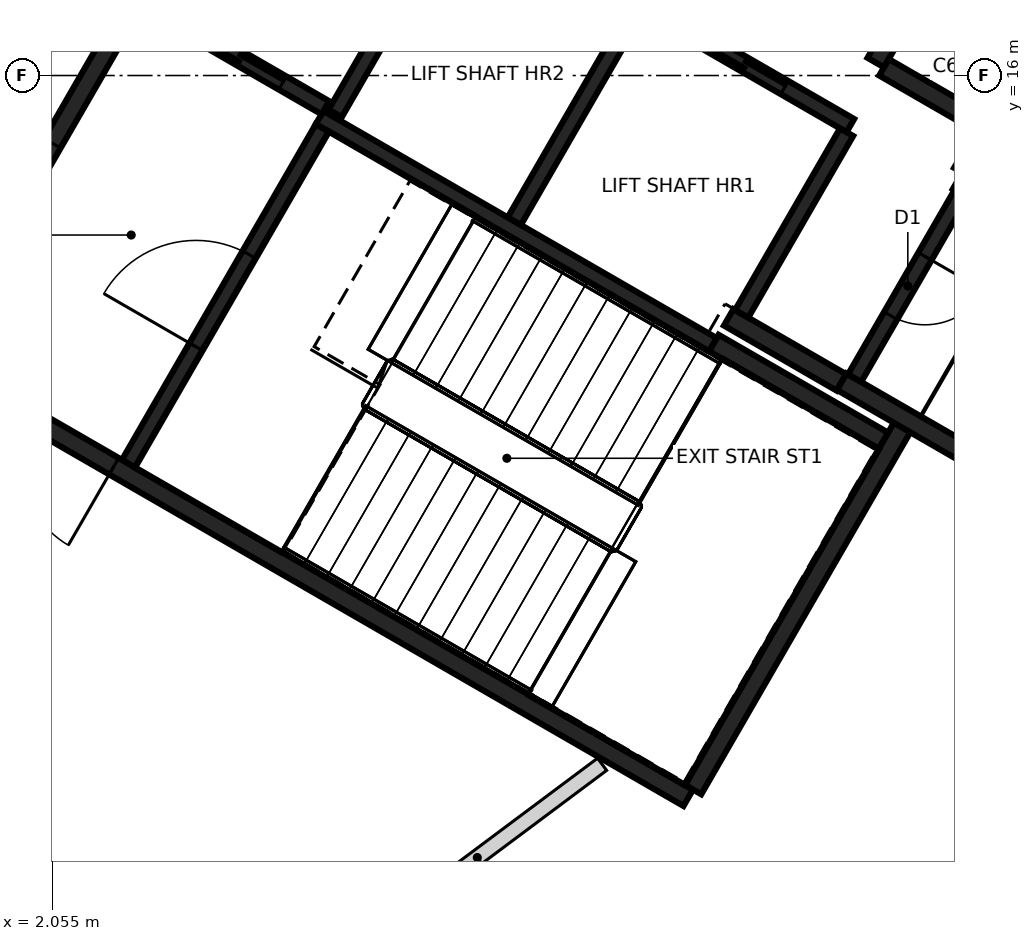
"""IFC4 building model, lengths in metres.
Left out: names, types, materials, properties, quantities, classifications, styles, units other than length and angle.
Written with IfcOpenShell. Run it as: python <this file> out.ifc"""

import sys

from ifc_helpers import new_model, si_unit, direction, frame, frame_2d, origin, place, context, subcontext, project, spatial, rectangle, extrude, element, fill, save


model = new_model("IFC4")
c1 = context("Model", 3, precision=1e-05, world=origin(), true_north=direction((0.0, 1.0)))
c2 = subcontext(c1, "Body", "Model", "MODEL_VIEW")
j1 = project(units=[si_unit("LENGTHUNIT", "METRE"), si_unit("PLANEANGLEUNIT", "RADIAN")], contexts=[c1])
p1 = place(None, origin())
s1 = spatial("IfcSite", under=j1, at=p1, CompositionType="ELEMENT")
p2 = place(p1, origin())
s2 = spatial("IfcBuilding", under=s1, at=p2, CompositionType="ELEMENT")
p3 = place(p2, frame((0.0, 0.0, 283.8)))
s3 = spatial("IfcBuildingStorey", under=s2, at=p3, CompositionType="ELEMENT", Elevation=283.8)
p4 = place(p3, frame((10.42, 6.498, 0.0), z_axis=(0.0, 0.0, 1.0), x_axis=(-0.866021906294, 0.500006057782, 0.0)))
e1 = element("IfcWall", 1, at=p4, inside=s3, PredefinedType="SHEAR", context=c2, shape_type="SweptSolid", body=[
    extrude(rectangle(XDim=11.55, YDim=0.25, at=frame_2d((5.775, 0.0))), origin(), (0.0, 0.0, 1.0), 6.85),
])
p5 = place(p4, frame((10.025, 0.0, 0.0)))
e2 = element("IfcOpeningElement", 2, at=p5, cuts=e1, PredefinedType="OPENING", context=c2, shape_type="SweptSolid", body=[
    extrude(rectangle(XDim=1.2, YDim=2.1, at=frame_2d((0.6, 1.05))), frame((0.0, 0.135, 0.0), z_axis=(0.0, -1.0, 0.0), x_axis=(1.0, 0.0, 0.0)), (0.0, 0.0, 1.0), 0.27),
])
p6 = place(p4, frame((8.725, 0.0, 0.0)))
e3 = element("IfcOpeningElement", 3, at=p6, cuts=e1, PredefinedType="OPENING", context=c2, shape_type="SweptSolid", body=[
    extrude(rectangle(XDim=1.2, YDim=2.1, at=frame_2d((0.6, 1.05))), frame((0.0, 0.135, 0.0), z_axis=(0.0, -1.0, 0.0), x_axis=(1.0, 0.0, 0.0)), (0.0, 0.0, 1.0), 0.27),
])
p7 = place(p3, frame((0.48, 12.381, 0.0), z_axis=(0.0, 0.0, 1.0), x_axis=(0.49999885962, 0.866026062182, 0.0)))
e4 = element("IfcWall", 4, at=p7, inside=s3, PredefinedType="SHEAR", context=c2, shape_type="SweptSolid", body=[
    extrude(rectangle(XDim=5.225, YDim=0.25, at=frame_2d((2.612, 0.0))), origin(), (0.0, 0.0, 1.0), 6.85),
])
p8 = place(p7, frame((1.949, 0.0, 0.0)))
e5 = element("IfcOpeningElement", 5, at=p8, cuts=e4, PredefinedType="OPENING", context=c2, shape_type="SweptSolid", body=[
    extrude(rectangle(XDim=1.2, YDim=2.1, at=frame_2d((0.6, 1.05))), frame((0.0, 0.135, 0.0), z_axis=(0.0, -1.0, 0.0), x_axis=(1.0, 0.0, 0.0)), (0.0, 0.0, 1.0), 0.27),
])
p9 = place(p3, frame((13.238, 11.378, 0.0), z_axis=(0.0, 0.0, 1.0), x_axis=(-0.500008851346, -0.866020293397, 0.0)))
e6 = element("IfcWall", 6, at=p9, inside=s3, PredefinedType="SHEAR", context=c2, shape_type="SweptSolid", body=[
    extrude(rectangle(XDim=5.51, YDim=0.25, at=frame_2d((2.755, 0.0))), origin(), (0.0, 0.0, 1.0), 6.85),
])
p10 = place(p3, frame((14.918, 10.54, 0.0), z_axis=(0.0, 0.0, 1.0), x_axis=(-0.866063538972, 0.499933942099, 0.0)))
e7 = element("IfcWall", 7, at=p10, inside=s3, PredefinedType="SHEAR", context=c2, shape_type="SweptSolid", body=[
    extrude(rectangle(XDim=2.865, YDim=0.25, at=frame_2d((1.432, 0.0))), origin(), (0.0, 0.0, 1.0), 6.85),
])
p11 = place(p3, frame((13.963, 14.614, 0.0), z_axis=(0.0, 0.0, 1.0), x_axis=(0.866042235819, -0.499970844928, 0.0)))
e8 = element("IfcWall", 8, at=p11, inside=s3, PredefinedType="SHEAR", context=c2, shape_type="SweptSolid", body=[
    extrude(rectangle(XDim=2.865, YDim=0.25, at=frame_2d((1.432, 0.0))), origin(), (0.0, 0.0, 1.0), 6.85),
])
p12 = place(p3, frame((10.757, 12.481, 0.0), z_axis=(0.0, 0.0, 1.0), x_axis=(0.866022940537, -0.500004266446, 0.0)))
e9 = element("IfcWall", 9, at=p12, inside=s3, PredefinedType="SHEAR", context=c2, shape_type="SweptSolid", body=[
    extrude(rectangle(XDim=2.575, YDim=0.25, at=frame_2d((1.287, 0.0))), origin(), (0.0, 0.0, 1.0), 6.85),
])
p13 = place(p3, frame((13.819, 17.785, 0.0), z_axis=(0.0, 0.0, 1.0), x_axis=(-0.500039802285, -0.866002422705, 0.0)))
e10 = element("IfcWall", 10, at=p13, inside=s3, PredefinedType="SHEAR", context=c2, shape_type="SweptSolid", body=[
    extrude(rectangle(XDim=1.865, YDim=0.25, at=frame_2d((0.932, 0.0))), origin(), (0.0, 0.0, 1.0), 6.85),
])
p14 = place(p3, frame((12.433, 11.964, 0.0), z_axis=(0.0, 0.0, 1.0), x_axis=(-0.866038183914, 0.499977863513, 0.0)))
e11 = element("IfcWall", 11, at=p14, inside=s3, PredefinedType="SHEAR", context=c2, shape_type="SweptSolid", body=[
    extrude(rectangle(XDim=1.71, YDim=0.25, at=frame_2d((0.855, 0.0))), origin(), (0.0, 0.0, 1.0), 6.85),
])
p15 = place(p3, frame((12.995, 16.108, 0.0), z_axis=(0.0, 0.0, 1.0), x_axis=(0.866044474677, -0.49996696679, 0.0)))
e12 = element("IfcWall", 12, at=p15, inside=s3, PredefinedType="SHEAR", context=c2, shape_type="SweptSolid", body=[
    extrude(rectangle(XDim=1.584, YDim=0.25, at=frame_2d((0.792, 0.0))), origin(), (0.0, 0.0, 1.0), 6.85),
])
p16 = place(p3, frame((14.305, 15.207, 0.0), z_axis=(0.0, 0.0, 1.0), x_axis=(-0.499848422343, -0.866112899501, 0.0)))
e13 = element("IfcWall", 13, at=p16, inside=s3, PredefinedType="SHEAR", context=c2, shape_type="SweptSolid", body=[
    extrude(rectangle(XDim=0.559, YDim=0.25, at=frame_2d((0.28, 0.0))), origin(), (0.0, 0.0, 1.0), 6.85),
])
p17 = place(p3, frame((12.552, 15.342, 0.0), z_axis=(0.0, 0.0, 1.0), x_axis=(-0.866030299012, 0.499991521122, 0.0)))
e14 = element("IfcWall", 14, at=p17, inside=s3, PredefinedType="SHEAR", context=c2, shape_type="SweptSolid", body=[
    extrude(rectangle(XDim=6.1, YDim=0.2, at=frame_2d((3.05, 0.0))), origin(), (0.0, 0.0, 1.0), 6.85),
])
p18 = place(p17, frame((1.0, 0.0, 0.0)))
e15 = element("IfcOpeningElement", 15, at=p18, cuts=e14, PredefinedType="OPENING", context=c2, shape_type="SweptSolid", body=[
    extrude(rectangle(XDim=1.2, YDim=2.1, at=frame_2d((0.6, 1.05))), frame((0.0, 0.11, 0.0), z_axis=(0.0, -1.0, 0.0), x_axis=(1.0, 0.0, 0.0)), (0.0, 0.0, 1.0), 0.22),
])
p19 = place(p17, frame((3.982, 0.0, 0.0)))
e16 = element("IfcOpeningElement", 16, at=p19, cuts=e14, PredefinedType="OPENING", context=c2, shape_type="SweptSolid", body=[
    extrude(rectangle(XDim=1.2, YDim=2.1, at=frame_2d((0.6, 1.05))), frame((0.0, 0.11, 0.0), z_axis=(0.0, -1.0, 0.0), x_axis=(1.0, 0.0, 0.0)), (0.0, 0.0, 1.0), 0.22),
])
p20 = place(p3, frame((10.743, 12.46, 0.0), z_axis=(0.0, 0.0, 1.0), x_axis=(-0.866018848283, 0.500011354289, 0.0)))
e17 = element("IfcWall", 17, at=p20, inside=s3, PredefinedType="SHEAR", context=c2, shape_type="SweptSolid", body=[
    extrude(rectangle(XDim=5.974, YDim=0.2, at=frame_2d((2.987, 0.0))), origin(), (0.0, 0.0, 1.0), 6.85),
])
p21 = place(p3, frame((3.057, 10.895, 0.0), z_axis=(0.0, 0.0, 1.0), x_axis=(0.500027839223, 0.866009330205, 0.0)))
e18 = element("IfcWall", 18, at=p21, inside=s3, PredefinedType="SHEAR", context=c2, shape_type="SweptSolid", body=[
    extrude(rectangle(XDim=5.098, YDim=0.2, at=frame_2d((2.549, 0.0))), origin(), (0.0, 0.0, 1.0), 6.85),
])
p22 = place(p21, frame((1.774, 0.0, 0.0)))
e19 = element("IfcOpeningElement", 19, at=p22, cuts=e18, PredefinedType="OPENING", context=c2, shape_type="SweptSolid", body=[
    extrude(rectangle(XDim=1.4, YDim=2.1, at=frame_2d((0.7, 1.05))), frame((0.0, 0.11, 0.0), z_axis=(0.0, -1.0, 0.0), x_axis=(1.0, 0.0, 0.0)), (0.0, 0.0, 1.0), 0.22),
])
p23 = place(p3, frame((8.132, 14.084, 0.0), z_axis=(0.0, 0.0, 1.0), x_axis=(0.500030834389, 0.86600760081, 0.0)))
e20 = element("IfcWall", 20, at=p23, inside=s3, PredefinedType="SHEAR", context=c2, shape_type="SweptSolid", body=[
    extrude(rectangle(XDim=3.198, YDim=0.2, at=frame_2d((1.599, 0.0))), origin(), (0.0, 0.0, 1.0), 6.85),
])
p24 = place(p3, frame((14.008, 14.442, 0.0), z_axis=(0.0, 0.0, 1.0), x_axis=(-0.499986818241, -0.866033014143, 0.0)))
e21 = element("IfcWall", 21, at=p24, inside=s3, PredefinedType="SHEAR", context=c2, shape_type="SweptSolid", body=[
    extrude(rectangle(XDim=2.798, YDim=0.2, at=frame_2d((1.399, 0.0))), origin(), (0.0, 0.0, 1.0), 6.85),
])
p25 = place(p24, frame((0.949, 0.0, 0.0)))
e22 = element("IfcOpeningElement", 22, at=p25, cuts=e21, PredefinedType="OPENING", context=c2, shape_type="SweptSolid", body=[
    extrude(rectangle(XDim=0.9, YDim=2.1, at=frame_2d((0.45, 1.05))), frame((0.0, 0.11, 0.0), z_axis=(0.0, -1.0, 0.0), x_axis=(1.0, 0.0, 0.0)), (0.0, 0.0, 1.0), 0.22),
])
p26 = place(p3, frame((12.502, 15.255, 0.0), z_axis=(0.0, 0.0, 1.0), x_axis=(-0.499965018551, -0.866045599391, 0.0)))
e23 = element("IfcWall", 23, at=p26, inside=s3, PredefinedType="SHEAR", context=c2, shape_type="SweptSolid", body=[
    extrude(rectangle(XDim=2.759, YDim=0.2, at=frame_2d((1.379, 0.0))), origin(), (0.0, 0.0, 1.0), 6.85),
])
p27 = place(p3, frame((7.324, 18.187, 0.0), z_axis=(0.0, 0.0, 1.0), x_axis=(-0.499967891604, -0.866043940782, 0.0)))
e24 = element("IfcWall", 24, at=p27, inside=s3, PredefinedType="SHEAR", context=c2, shape_type="SweptSolid", body=[
    extrude(rectangle(XDim=3.1, YDim=0.2, at=frame_2d((1.55, 0.0))), origin(), (0.0, 0.0, 1.0), 6.85),
])
p28 = place(p3, frame((5.646, 15.576, 0.0), z_axis=(0.0, 0.0, 1.0), x_axis=(-0.866018407898, 0.500012117035, 0.0)))
e25 = element("IfcWall", 25, at=p28, inside=s3, PredefinedType="SHEAR", context=c2, shape_type="SweptSolid", body=[
    extrude(rectangle(XDim=2.651, YDim=0.2, at=frame_2d((1.325, 0.0))), origin(), (0.0, 0.0, 1.0), 6.85),
])
p29 = place(p28, frame((0.652, 0.0, 0.0)))
e26 = element("IfcOpeningElement", 26, at=p29, cuts=e25, PredefinedType="OPENING", context=c2, shape_type="SweptSolid", body=[
    extrude(rectangle(XDim=1.3, YDim=2.1, at=frame_2d((0.65, 1.05))), frame((0.0, 0.11, 0.0), z_axis=(0.0, -1.0, 0.0), x_axis=(1.0, 0.0, 0.0)), (0.0, 0.0, 1.0), 0.22),
])
p30 = place(p3, frame((-0.891, 13.057, 0.0), z_axis=(0.0, 0.0, 1.0), x_axis=(0.499999420379, 0.866025738428, 0.0)))
e27 = element("IfcWall", 27, at=p30, inside=s3, PredefinedType="PARTITIONING", context=c2, shape_type="SweptSolid", body=[
    extrude(rectangle(XDim=6.537, YDim=0.2, at=frame_2d((3.268, 0.0))), origin(), (0.0, 0.0, 1.0), 6.85),
])
p31 = place(p3, frame((6.002, 4.485, 0.0), z_axis=(0.0, 0.0, 1.0), x_axis=(0.801184670972, 0.598417181403, 0.0)))
e28 = element("IfcWall", 28, at=p31, inside=s3, PredefinedType="PARTITIONING", context=c2, shape_type="SweptSolid", body=[
    extrude(rectangle(XDim=4.1, YDim=0.2, at=frame_2d((2.05, 0.0))), origin(), (0.0, 0.0, 1.0), 6.85),
])
p32 = place(p29, origin())
e29 = element("IfcDoor", 29, at=p32, inside=s3, OperationType="SLIDING_TO_RIGHT", PredefinedType="DOOR", context=c2, shape_type="SweptSolid", body=[
    extrude(rectangle(XDim=1.3, YDim=2.1, at=frame_2d((0.65, 1.05))), frame((0.0, 0.025, 0.0), z_axis=(0.0, -1.0, 0.0), x_axis=(1.0, 0.0, 0.0)), (0.0, 0.0, 1.0), 0.05),
])
fill(e26, e29)
p33 = place(p18, origin())
e30 = element("IfcDoor", 30, at=p33, inside=s3, OperationType="DOUBLE_DOOR_SLIDING", PredefinedType="DOOR", context=c2, shape_type="SweptSolid", body=[
    extrude(rectangle(XDim=1.2, YDim=2.1, at=frame_2d((0.6, 1.05))), frame((0.0, 0.025, 0.0), z_axis=(0.0, -1.0, 0.0), x_axis=(1.0, 0.0, 0.0)), (0.0, 0.0, 1.0), 0.05),
])
fill(e15, e30)
p34 = place(p6, origin())
e31 = element("IfcDoor", 31, at=p34, inside=s3, OperationType="SINGLE_SWING_RIGHT", PredefinedType="DOOR", context=c2, shape_type="SweptSolid", body=[
    extrude(rectangle(XDim=1.2, YDim=2.1, at=frame_2d((0.6, 1.05))), frame((0.0, 0.025, 0.0), z_axis=(0.0, -1.0, 0.0), x_axis=(1.0, 0.0, 0.0)), (0.0, 0.0, 1.0), 0.05),
])
fill(e3, e31)
p35 = place(p8, origin())
e32 = element("IfcDoor", 32, at=p35, inside=s3, OperationType="SINGLE_SWING_LEFT", PredefinedType="DOOR", context=c2, shape_type="SweptSolid", body=[
    extrude(rectangle(XDim=1.2, YDim=2.1, at=frame_2d((0.6, 1.05))), frame((0.0, 0.025, 0.0), z_axis=(0.0, -1.0, 0.0), x_axis=(1.0, 0.0, 0.0)), (0.0, 0.0, 1.0), 0.05),
])
fill(e5, e32)
p36 = place(p22, origin())
e33 = element("IfcDoor", 33, at=p36, inside=s3, OperationType="SINGLE_SWING_LEFT", PredefinedType="DOOR", context=c2, shape_type="SweptSolid", body=[
    extrude(rectangle(XDim=1.4, YDim=2.1, at=frame_2d((0.7, 1.05))), frame((0.0, 0.025, 0.0), z_axis=(0.0, -1.0, 0.0), x_axis=(1.0, 0.0, 0.0)), (0.0, 0.0, 1.0), 0.05),
])
fill(e19, e33)
p37 = place(p25, origin())
e34 = element("IfcDoor", 34, at=p37, inside=s3, OperationType="SINGLE_SWING_RIGHT", PredefinedType="DOOR", context=c2, shape_type="SweptSolid", body=[
    extrude(rectangle(XDim=0.9, YDim=2.1, at=frame_2d((0.45, 1.05))), frame((0.0, 0.025, 0.0), z_axis=(0.0, -1.0, 0.0), x_axis=(1.0, 0.0, 0.0)), (0.0, 0.0, 1.0), 0.05),
])
fill(e22, e34)
save(model, sys.argv[1])
